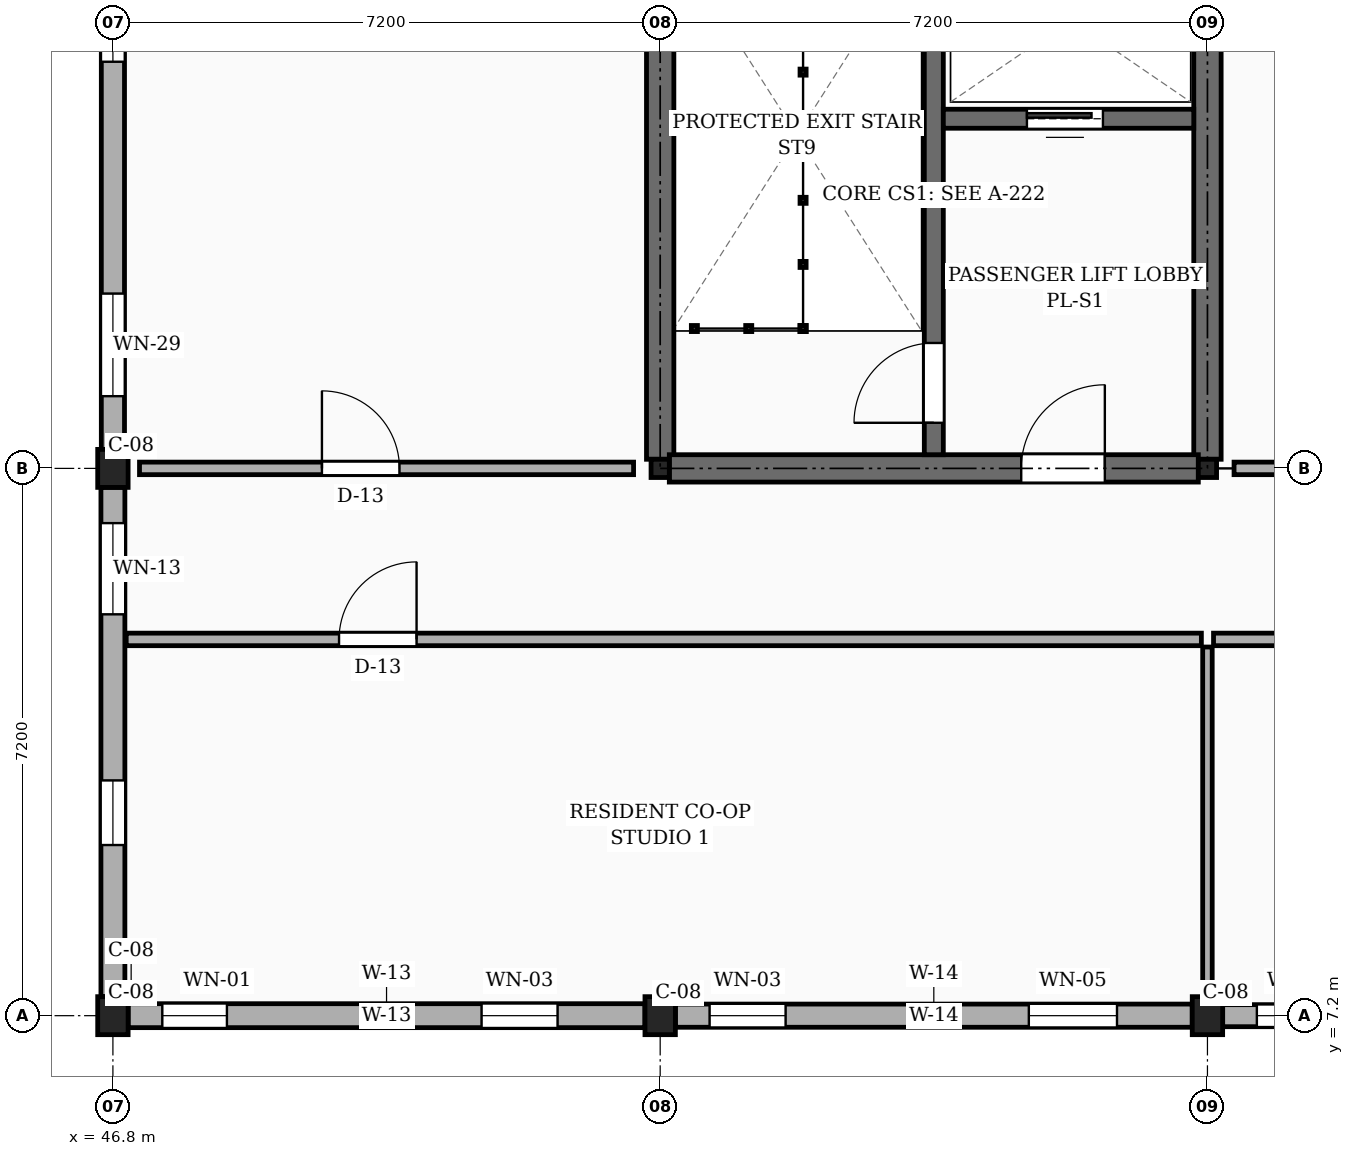
"""IFC4 building model, lengths in metres.
Left out: names, types, materials, properties, quantities, classifications, styles, units other than length and angle.
Written with IfcOpenShell. Run it as: python <this file> out.ifc"""

import sys

from ifc_helpers import new_model, si_unit, direction, frame, frame_2d, origin, origin_2d, place, context, subcontext, project, spatial, rectangle, i_section, extrude, element, fill, save


model = new_model("IFC4")
c1 = context("Model", 3, precision=1e-05, world=origin(), true_north=direction((0.0, 1.0)))
c2 = subcontext(c1, "Body", "Model", "MODEL_VIEW")
j1 = project(units=[si_unit("LENGTHUNIT", "METRE"), si_unit("PLANEANGLEUNIT", "RADIAN")], contexts=[c1])
p1 = place(None, origin())
s1 = spatial("IfcSite", under=j1, at=p1, CompositionType="ELEMENT")
p2 = place(p1, origin())
s2 = spatial("IfcBuilding", under=s1, at=p2, CompositionType="ELEMENT")
p3 = place(p2, frame((0.0, 0.0, 4.5)))
s3 = spatial("IfcBuildingStorey", under=s2, at=p3, CompositionType="ELEMENT", Elevation=4.5)
for number, where, z_axis, x_axis in (
    (1, (46.8, 7.2, 0.0), (0.0, 0.0, 1.0), (1.0, 0.0, 0.0)),
    (2, (46.8, 14.4, 0.0), (0.0, 0.0, 1.0), (1.0, 0.0, 0.0)),
    (3, (54.0, 7.2, 0.0), (0.0, 0.0, 1.0), (1.0, 0.0, 0.0)),
):
    element("IfcColumn", number, at=place(p3, frame(where, z_axis=z_axis, x_axis=x_axis)), inside=s3, PredefinedType="COLUMN", context=c2, shape_type="SweptSolid", body=[
        extrude(rectangle(XDim=0.4, YDim=0.5, at=origin_2d()), origin(), (0.0, 0.0, 1.0), 3.15),
    ])
p4 = place(p3, frame((54.0, 14.4, 0.0), z_axis=(0.0, 0.0, 1.0), x_axis=(1.0, 0.0, 0.0)))
e4 = element("IfcColumn", 4, at=p4, inside=s3, PredefinedType="COLUMN", context=c2, shape_type="SweptSolid", body=[
    extrude(i_section(OverallWidth=0.24, OverallDepth=0.24, WebThickness=0.01, FlangeThickness=0.017, FilletRadius=0.021, at=origin_2d()), origin(), (0.0, 0.0, 1.0), 3.15),
])
p5 = place(p3, frame((61.2, 7.2, 0.0), z_axis=(0.0, 0.0, 1.0), x_axis=(1.0, 0.0, 0.0)))
e5 = element("IfcColumn", 5, at=p5, inside=s3, PredefinedType="COLUMN", context=c2, shape_type="SweptSolid", body=[
    extrude(rectangle(XDim=0.4, YDim=0.5, at=origin_2d()), origin(), (0.0, 0.0, 1.0), 3.15),
])
p6 = place(p3, frame((61.2, 14.4, 0.0), z_axis=(0.0, 0.0, 1.0), x_axis=(1.0, 0.0, 0.0)))
e6 = element("IfcColumn", 6, at=p6, inside=s3, PredefinedType="COLUMN", context=c2, shape_type="SweptSolid", body=[
    extrude(i_section(OverallWidth=0.24, OverallDepth=0.24, WebThickness=0.01, FlangeThickness=0.017, FilletRadius=0.021, at=origin_2d()), origin(), (0.0, 0.0, 1.0), 3.15),
])
p7 = place(p3, frame((47.0, 7.2, 0.0), z_axis=(0.0, 0.0, 1.0), x_axis=(1.0, 0.0, 0.0)))
e7 = element("IfcWall", 7, at=p7, inside=s3, PredefinedType="SOLIDWALL", context=c2, shape_type="SweptSolid", body=[
    extrude(rectangle(XDim=6.8, YDim=0.315, at=frame_2d((3.4, 0.0))), origin(), (0.0, 0.0, 1.0), 2.34),
])
p8 = place(p7, frame((0.45, 0.0, 0.78)))
e8 = element("IfcOpeningElement", 8, at=p8, cuts=e7, PredefinedType="OPENING", context=c2, shape_type="SweptSolid", body=[
    extrude(rectangle(XDim=0.85, YDim=1.15, at=frame_2d((0.425, 0.575))), frame((0.0, 0.167, 0.0), z_axis=(0.0, -1.0, 0.0), x_axis=(1.0, 0.0, 0.0)), (0.0, 0.0, 1.0), 0.335),
])
p9 = place(p7, frame((4.65, 0.0, 0.78)))
e9 = element("IfcOpeningElement", 9, at=p9, cuts=e7, PredefinedType="OPENING", context=c2, shape_type="SweptSolid", body=[
    extrude(rectangle(XDim=1.0, YDim=1.15, at=frame_2d((0.5, 0.575))), frame((0.0, 0.167, 0.0), z_axis=(0.0, -1.0, 0.0), x_axis=(1.0, 0.0, 0.0)), (0.0, 0.0, 1.0), 0.335),
])
p10 = place(p3, frame((54.2, 7.2, 0.0), z_axis=(0.0, 0.0, 1.0), x_axis=(1.0, 0.0, 0.0)))
e10 = element("IfcWall", 10, at=p10, inside=s3, PredefinedType="SOLIDWALL", context=c2, shape_type="SweptSolid", body=[
    extrude(rectangle(XDim=6.8, YDim=0.305, at=frame_2d((3.4, 0.0))), origin(), (0.0, 0.0, 1.0), 2.34),
])
p11 = place(p10, frame((0.45, 0.0, 0.78)))
e11 = element("IfcOpeningElement", 11, at=p11, cuts=e10, PredefinedType="OPENING", context=c2, shape_type="SweptSolid", body=[
    extrude(rectangle(XDim=1.0, YDim=1.15, at=frame_2d((0.5, 0.575))), frame((0.0, 0.163, 0.0), z_axis=(0.0, -1.0, 0.0), x_axis=(1.0, 0.0, 0.0)), (0.0, 0.0, 1.0), 0.325),
])
p12 = place(p10, frame((4.65, 0.0, 0.78)))
e12 = element("IfcOpeningElement", 12, at=p12, cuts=e10, PredefinedType="OPENING", context=c2, shape_type="SweptSolid", body=[
    extrude(rectangle(XDim=1.16, YDim=1.15, at=frame_2d((0.58, 0.575))), frame((0.0, 0.163, 0.0), z_axis=(0.0, -1.0, 0.0), x_axis=(1.0, 0.0, 0.0)), (0.0, 0.0, 1.0), 0.325),
])
p13 = place(p3, frame((61.4, 7.2, 0.0), z_axis=(0.0, 0.0, 1.0), x_axis=(1.0, 0.0, 0.0)))
e13 = element("IfcWall", 13, at=p13, inside=s3, PredefinedType="SOLIDWALL", context=c2, shape_type="SweptSolid", body=[
    extrude(rectangle(XDim=6.8, YDim=0.29, at=frame_2d((3.4, 0.0))), origin(), (0.0, 0.0, 1.0), 2.34),
])
p14 = place(p13, frame((0.45, 0.0, 0.78)))
e14 = element("IfcOpeningElement", 14, at=p14, cuts=e13, PredefinedType="OPENING", context=c2, shape_type="SweptSolid", body=[
    extrude(rectangle(XDim=1.16, YDim=1.15, at=frame_2d((0.58, 0.575))), frame((0.0, 0.155, 0.0), z_axis=(0.0, -1.0, 0.0), x_axis=(1.0, 0.0, 0.0)), (0.0, 0.0, 1.0), 0.31),
])
p15 = place(p13, frame((4.65, 0.0, 0.78)))
e15 = element("IfcOpeningElement", 15, at=p15, cuts=e13, PredefinedType="OPENING", context=c2, shape_type="SweptSolid", body=[
    extrude(rectangle(XDim=1.32, YDim=1.15, at=frame_2d((0.66, 0.575))), frame((0.0, 0.155, 0.0), z_axis=(0.0, -1.0, 0.0), x_axis=(1.0, 0.0, 0.0)), (0.0, 0.0, 1.0), 0.31),
])
p16 = place(p3, frame((46.8, 21.35, 0.0), z_axis=(0.0, 0.0, 1.0), x_axis=(0.0, -1.0, 0.0)))
e16 = element("IfcWall", 16, at=p16, inside=s3, PredefinedType="SOLIDWALL", context=c2, shape_type="SweptSolid", body=[
    extrude(rectangle(XDim=6.7, YDim=0.305, at=frame_2d((3.35, 0.0))), origin(), (0.0, 0.0, 1.0), 2.34),
])
p17 = place(p16, frame((0.45, 0.0, 0.78)))
e17 = element("IfcOpeningElement", 17, at=p17, cuts=e16, PredefinedType="OPENING", context=c2, shape_type="SweptSolid", body=[
    extrude(rectangle(XDim=1.15, YDim=1.44, at=frame_2d((0.575, 0.72))), frame((0.0, 0.163, 0.0), z_axis=(0.0, -1.0, 0.0), x_axis=(1.0, 0.0, 0.0)), (0.0, 0.0, 1.0), 0.325),
])
p18 = place(p16, frame((4.65, 0.0, 0.78)))
e18 = element("IfcOpeningElement", 18, at=p18, cuts=e16, PredefinedType="OPENING", context=c2, shape_type="SweptSolid", body=[
    extrude(rectangle(XDim=1.35, YDim=1.44, at=frame_2d((0.675, 0.72))), frame((0.0, 0.163, 0.0), z_axis=(0.0, -1.0, 0.0), x_axis=(1.0, 0.0, 0.0)), (0.0, 0.0, 1.0), 0.325),
])
p19 = place(p3, frame((46.8, 14.15, 0.0), z_axis=(0.0, 0.0, 1.0), x_axis=(0.0, -1.0, 0.0)))
e19 = element("IfcWall", 19, at=p19, inside=s3, PredefinedType="SOLIDWALL", context=c2, shape_type="SweptSolid", body=[
    extrude(rectangle(XDim=6.7, YDim=0.315, at=frame_2d((3.35, 0.0))), origin(), (0.0, 0.0, 1.0), 2.34),
])
p20 = place(p19, frame((0.47, 0.0, 0.78)))
e20 = element("IfcOpeningElement", 20, at=p20, cuts=e19, PredefinedType="OPENING", context=c2, shape_type="SweptSolid", body=[
    extrude(rectangle(XDim=1.2, YDim=1.26, at=frame_2d((0.6, 0.63))), frame((0.0, 0.167, 0.0), z_axis=(0.0, -1.0, 0.0), x_axis=(1.0, 0.0, 0.0)), (0.0, 0.0, 1.0), 0.335),
])
p21 = place(p19, frame((3.855, 0.0, 0.78)))
e21 = element("IfcOpeningElement", 21, at=p21, cuts=e19, PredefinedType="OPENING", context=c2, shape_type="SweptSolid", body=[
    extrude(rectangle(XDim=0.85, YDim=1.15, at=frame_2d((0.425, 0.575))), frame((0.0, 0.167, 0.0), z_axis=(0.0, -1.0, 0.0), x_axis=(1.0, 0.0, 0.0)), (0.0, 0.0, 1.0), 0.335),
])
for number, where, z_axis, x_axis in (
    (22, (54.0, 14.52, 0.0), (0.0, 0.0, 1.0), (0.0, 1.0, 0.0)),
    (23, (61.2, 14.52, 0.0), (0.0, 0.0, 1.0), (0.0, 1.0, 0.0)),
):
    element("IfcWall", number, at=place(p3, frame(where, z_axis=z_axis, x_axis=x_axis)), inside=s3, PredefinedType="SHEAR", context=c2, shape_type="SweptSolid", body=[
        extrude(rectangle(XDim=6.96, YDim=0.36, at=frame_2d((3.48, 0.0))), origin(), (0.0, 0.0, 1.0), 2.89),
    ])
p22 = place(p3, frame((54.12, 14.4, 0.0), z_axis=(0.0, 0.0, 1.0), x_axis=(1.0, 0.0, 0.0)))
e24 = element("IfcWall", 24, at=p22, inside=s3, PredefinedType="SHEAR", context=c2, shape_type="SweptSolid", body=[
    extrude(rectangle(XDim=6.96, YDim=0.36, at=frame_2d((3.48, 0.0))), origin(), (0.0, 0.0, 1.0), 2.89),
])
p23 = place(p22, frame((4.63, 0.0, 0.0)))
e25 = element("IfcOpeningElement", 25, at=p23, cuts=e24, PredefinedType="OPENING", context=c2, shape_type="SweptSolid", body=[
    extrude(rectangle(XDim=1.1, YDim=2.15, at=frame_2d((0.55, 1.075))), frame((0.0, 0.19, 0.0), z_axis=(0.0, -1.0, 0.0), x_axis=(1.0, 0.0, 0.0)), (0.0, 0.0, 1.0), 0.38),
])
p24 = place(p3, frame((57.6, 14.58, 0.0), z_axis=(0.0, 0.0, 1.0), x_axis=(0.0, 1.0, 0.0)))
e26 = element("IfcWall", 26, at=p24, inside=s3, PredefinedType="SHEAR", context=c2, shape_type="SweptSolid", body=[
    extrude(rectangle(XDim=6.84, YDim=0.25, at=frame_2d((3.42, 0.0))), origin(), (0.0, 0.0, 1.0), 2.89),
])
p25 = place(p24, frame((0.42, 0.0, 0.0)))
e27 = element("IfcOpeningElement", 27, at=p25, cuts=e26, PredefinedType="OPENING", context=c2, shape_type="SweptSolid", body=[
    extrude(rectangle(XDim=1.05, YDim=2.15, at=frame_2d((0.525, 1.075))), frame((0.0, 0.135, 0.0), z_axis=(0.0, -1.0, 0.0), x_axis=(1.0, 0.0, 0.0)), (0.0, 0.0, 1.0), 0.27),
])
p26 = place(p3, frame((57.725, 19.0, 0.0), z_axis=(0.0, 0.0, 1.0), x_axis=(1.0, 0.0, 0.0)))
e28 = element("IfcWall", 28, at=p26, inside=s3, PredefinedType="SHEAR", context=c2, shape_type="SweptSolid", body=[
    extrude(rectangle(XDim=3.295, YDim=0.25, at=frame_2d((1.647, 0.0))), origin(), (0.0, 0.0, 1.0), 2.89),
])
p27 = place(p26, frame((1.1, 0.0, 0.0)))
e29 = element("IfcOpeningElement", 29, at=p27, cuts=e28, PredefinedType="OPENING", context=c2, shape_type="SweptSolid", body=[
    extrude(rectangle(XDim=1.0, YDim=2.2, at=frame_2d((0.5, 1.1))), frame((0.0, 0.135, 0.0), z_axis=(0.0, -1.0, 0.0), x_axis=(1.0, 0.0, 0.0)), (0.0, 0.0, 1.0), 0.27),
])
p28 = place(p3, frame((46.975, 12.15, 0.0), z_axis=(0.0, 0.0, 1.0), x_axis=(1.0, 0.0, 0.0)))
e30 = element("IfcWall", 30, at=p28, inside=s3, PredefinedType="PARTITIONING", context=c2, shape_type="SweptSolid", body=[
    extrude(rectangle(XDim=14.145, YDim=0.165, at=frame_2d((7.073, 0.0))), origin(), (0.0, 0.0, 1.0), 2.29),
])
p29 = place(p28, frame((2.8, 0.0, 0.0)))
e31 = element("IfcOpeningElement", 31, at=p29, cuts=e30, PredefinedType="OPENING", context=c2, shape_type="SweptSolid", body=[
    extrude(rectangle(XDim=1.02, YDim=2.15, at=frame_2d((0.51, 1.075))), frame((0.0, 0.093, 0.0), z_axis=(0.0, -1.0, 0.0), x_axis=(1.0, 0.0, 0.0)), (0.0, 0.0, 1.0), 0.185),
])
p30 = place(p3, frame((61.28, 12.15, 0.0), z_axis=(0.0, 0.0, 1.0), x_axis=(1.0, 0.0, 0.0)))
e32 = element("IfcWall", 32, at=p30, inside=s3, PredefinedType="PARTITIONING", context=c2, shape_type="SweptSolid", body=[
    extrude(rectangle(XDim=14.24, YDim=0.165, at=frame_2d((7.12, 0.0))), origin(), (0.0, 0.0, 1.0), 2.29),
])
p31 = place(p30, frame((2.8, 0.0, 0.0)))
e33 = element("IfcOpeningElement", 33, at=p31, cuts=e32, PredefinedType="OPENING", context=c2, shape_type="SweptSolid", body=[
    extrude(rectangle(XDim=1.02, YDim=2.15, at=frame_2d((0.51, 1.075))), frame((0.0, 0.093, 0.0), z_axis=(0.0, -1.0, 0.0), x_axis=(1.0, 0.0, 0.0)), (0.0, 0.0, 1.0), 0.185),
])
p32 = place(p3, frame((61.2, 7.55, 0.0), z_axis=(0.0, 0.0, 1.0), x_axis=(0.0, 1.0, 0.0)))
e34 = element("IfcWall", 34, at=p32, inside=s3, PredefinedType="PARTITIONING", context=c2, shape_type="SweptSolid", body=[
    extrude(rectangle(XDim=4.5, YDim=0.125, at=frame_2d((2.25, 0.0))), origin(), (0.0, 0.0, 1.0), 2.29),
])
p33 = place(p3, frame((47.15, 14.4, 0.0), z_axis=(0.0, 0.0, 1.0), x_axis=(1.0, 0.0, 0.0)))
e35 = element("IfcWall", 35, at=p33, inside=s3, PredefinedType="PARTITIONING", context=c2, shape_type="SweptSolid", body=[
    extrude(rectangle(XDim=6.5, YDim=0.165, at=frame_2d((3.25, 0.0))), origin(), (0.0, 0.0, 1.0), 2.29),
])
p34 = place(p33, frame((2.4, 0.0, 0.0)))
e36 = element("IfcOpeningElement", 36, at=p34, cuts=e35, PredefinedType="OPENING", context=c2, shape_type="SweptSolid", body=[
    extrude(rectangle(XDim=1.02, YDim=2.15, at=frame_2d((0.51, 1.075))), frame((0.0, 0.093, 0.0), z_axis=(0.0, -1.0, 0.0), x_axis=(1.0, 0.0, 0.0)), (0.0, 0.0, 1.0), 0.185),
])
p35 = place(p3, frame((61.55, 14.4, 0.0), z_axis=(0.0, 0.0, 1.0), x_axis=(1.0, 0.0, 0.0)))
e37 = element("IfcWall", 37, at=p35, inside=s3, PredefinedType="PARTITIONING", context=c2, shape_type="SweptSolid", body=[
    extrude(rectangle(XDim=13.7, YDim=0.165, at=frame_2d((6.85, 0.0))), origin(), (0.0, 0.0, 1.0), 2.29),
])
p36 = place(p35, frame((2.4, 0.0, 0.0)))
e38 = element("IfcOpeningElement", 38, at=p36, cuts=e37, PredefinedType="OPENING", context=c2, shape_type="SweptSolid", body=[
    extrude(rectangle(XDim=1.5, YDim=2.25, at=frame_2d((0.75, 1.125))), frame((0.0, 0.093, 0.0), z_axis=(0.0, -1.0, 0.0), x_axis=(1.0, 0.0, 0.0)), (0.0, 0.0, 1.0), 0.185),
])
p37 = place(p8, origin())
e39 = element("IfcWindow", 39, at=p37, inside=s3, PartitioningType="SINGLE_PANEL", PredefinedType="WINDOW", context=c2, shape_type="SweptSolid", body=[
    extrude(rectangle(XDim=0.85, YDim=1.15, at=frame_2d((0.425, 0.575))), frame((0.0, 0.03, 0.0), z_axis=(0.0, -1.0, 0.0), x_axis=(1.0, 0.0, 0.0)), (0.0, 0.0, 1.0), 0.06),
])
fill(e8, e39)
p38 = place(p9, origin())
e40 = element("IfcWindow", 40, at=p38, inside=s3, PartitioningType="SINGLE_PANEL", PredefinedType="WINDOW", context=c2, shape_type="SweptSolid", body=[
    extrude(rectangle(XDim=1.0, YDim=1.15, at=frame_2d((0.5, 0.575))), frame((0.0, 0.03, 0.0), z_axis=(0.0, -1.0, 0.0), x_axis=(1.0, 0.0, 0.0)), (0.0, 0.0, 1.0), 0.06),
])
fill(e9, e40)
p39 = place(p11, origin())
e41 = element("IfcWindow", 41, at=p39, inside=s3, PartitioningType="SINGLE_PANEL", PredefinedType="WINDOW", context=c2, shape_type="SweptSolid", body=[
    extrude(rectangle(XDim=1.0, YDim=1.15, at=frame_2d((0.5, 0.575))), frame((0.0, 0.03, 0.0), z_axis=(0.0, -1.0, 0.0), x_axis=(1.0, 0.0, 0.0)), (0.0, 0.0, 1.0), 0.06),
])
fill(e11, e41)
p40 = place(p12, origin())
e42 = element("IfcWindow", 42, at=p40, inside=s3, PartitioningType="SINGLE_PANEL", PredefinedType="WINDOW", context=c2, shape_type="SweptSolid", body=[
    extrude(rectangle(XDim=1.16, YDim=1.15, at=frame_2d((0.58, 0.575))), frame((0.0, 0.03, 0.0), z_axis=(0.0, -1.0, 0.0), x_axis=(1.0, 0.0, 0.0)), (0.0, 0.0, 1.0), 0.06),
])
fill(e12, e42)
p41 = place(p14, origin())
e43 = element("IfcWindow", 43, at=p41, inside=s3, PartitioningType="SINGLE_PANEL", PredefinedType="WINDOW", context=c2, shape_type="SweptSolid", body=[
    extrude(rectangle(XDim=1.16, YDim=1.15, at=frame_2d((0.58, 0.575))), frame((0.0, 0.03, 0.0), z_axis=(0.0, -1.0, 0.0), x_axis=(1.0, 0.0, 0.0)), (0.0, 0.0, 1.0), 0.06),
])
fill(e14, e43)
p42 = place(p17, origin())
e44 = element("IfcWindow", 44, at=p42, inside=s3, PartitioningType="SINGLE_PANEL", PredefinedType="WINDOW", context=c2, shape_type="SweptSolid", body=[
    extrude(rectangle(XDim=1.15, YDim=1.44, at=frame_2d((0.575, 0.72))), frame((0.0, 0.03, 0.0), z_axis=(0.0, -1.0, 0.0), x_axis=(1.0, 0.0, 0.0)), (0.0, 0.0, 1.0), 0.06),
])
fill(e17, e44)
p43 = place(p18, origin())
e45 = element("IfcWindow", 45, at=p43, inside=s3, PartitioningType="SINGLE_PANEL", PredefinedType="WINDOW", context=c2, shape_type="SweptSolid", body=[
    extrude(rectangle(XDim=1.35, YDim=1.44, at=frame_2d((0.675, 0.72))), frame((0.0, 0.03, 0.0), z_axis=(0.0, -1.0, 0.0), x_axis=(1.0, 0.0, 0.0)), (0.0, 0.0, 1.0), 0.06),
])
fill(e18, e45)
p44 = place(p20, origin())
e46 = element("IfcWindow", 46, at=p44, inside=s3, PartitioningType="SINGLE_PANEL", PredefinedType="WINDOW", context=c2, shape_type="SweptSolid", body=[
    extrude(rectangle(XDim=1.2, YDim=1.26, at=frame_2d((0.6, 0.63))), frame((0.0, 0.03, 0.0), z_axis=(0.0, -1.0, 0.0), x_axis=(1.0, 0.0, 0.0)), (0.0, 0.0, 1.0), 0.06),
])
fill(e20, e46)
p45 = place(p21, origin())
e47 = element("IfcWindow", 47, at=p45, inside=s3, PartitioningType="SINGLE_PANEL", PredefinedType="WINDOW", context=c2, shape_type="SweptSolid", body=[
    extrude(rectangle(XDim=0.85, YDim=1.15, at=frame_2d((0.425, 0.575))), frame((0.0, 0.03, 0.0), z_axis=(0.0, -1.0, 0.0), x_axis=(1.0, 0.0, 0.0)), (0.0, 0.0, 1.0), 0.06),
])
fill(e21, e47)
p46 = place(p23, frame((1.1, 0.0, 0.0), z_axis=(0.0, 0.0, 1.0), x_axis=(-1.0, 0.0, 0.0)))
e48 = element("IfcDoor", 48, at=p46, inside=s3, OperationType="SINGLE_SWING_RIGHT", PredefinedType="DOOR", context=c2, shape_type="SweptSolid", body=[
    extrude(rectangle(XDim=1.1, YDim=2.15, at=frame_2d((0.55, 1.075))), frame((0.0, 0.025, 0.0), z_axis=(0.0, -1.0, 0.0), x_axis=(1.0, 0.0, 0.0)), (0.0, 0.0, 1.0), 0.05),
])
fill(e25, e48)
p47 = place(p25, origin())
e49 = element("IfcDoor", 49, at=p47, inside=s3, OperationType="SINGLE_SWING_LEFT", PredefinedType="DOOR", context=c2, shape_type="SweptSolid", body=[
    extrude(rectangle(XDim=1.05, YDim=2.15, at=frame_2d((0.525, 1.075))), frame((0.0, 0.025, 0.0), z_axis=(0.0, -1.0, 0.0), x_axis=(1.0, 0.0, 0.0)), (0.0, 0.0, 1.0), 0.05),
])
fill(e27, e49)
p48 = place(p27, origin())
e50 = element("IfcDoor", 50, at=p48, inside=s3, OperationType="SLIDING_TO_LEFT", PredefinedType="DOOR", context=c2, shape_type="SweptSolid", body=[
    extrude(rectangle(XDim=1.0, YDim=2.2, at=frame_2d((0.5, 1.1))), frame((0.0, 0.025, 0.0), z_axis=(0.0, -1.0, 0.0), x_axis=(1.0, 0.0, 0.0)), (0.0, 0.0, 1.0), 0.05),
])
fill(e29, e50)
p49 = place(p29, origin())
e51 = element("IfcDoor", 51, at=p49, inside=s3, OperationType="SINGLE_SWING_RIGHT", PredefinedType="DOOR", context=c2, shape_type="SweptSolid", body=[
    extrude(rectangle(XDim=1.02, YDim=2.15, at=frame_2d((0.51, 1.075))), frame((0.0, 0.025, 0.0), z_axis=(0.0, -1.0, 0.0), x_axis=(1.0, 0.0, 0.0)), (0.0, 0.0, 1.0), 0.05),
])
fill(e31, e51)
p50 = place(p34, origin())
e52 = element("IfcDoor", 52, at=p50, inside=s3, OperationType="SINGLE_SWING_LEFT", PredefinedType="DOOR", context=c2, shape_type="SweptSolid", body=[
    extrude(rectangle(XDim=1.02, YDim=2.15, at=frame_2d((0.51, 1.075))), frame((0.0, 0.025, 0.0), z_axis=(0.0, -1.0, 0.0), x_axis=(1.0, 0.0, 0.0)), (0.0, 0.0, 1.0), 0.05),
])
fill(e36, e52)
save(model, sys.argv[1])
